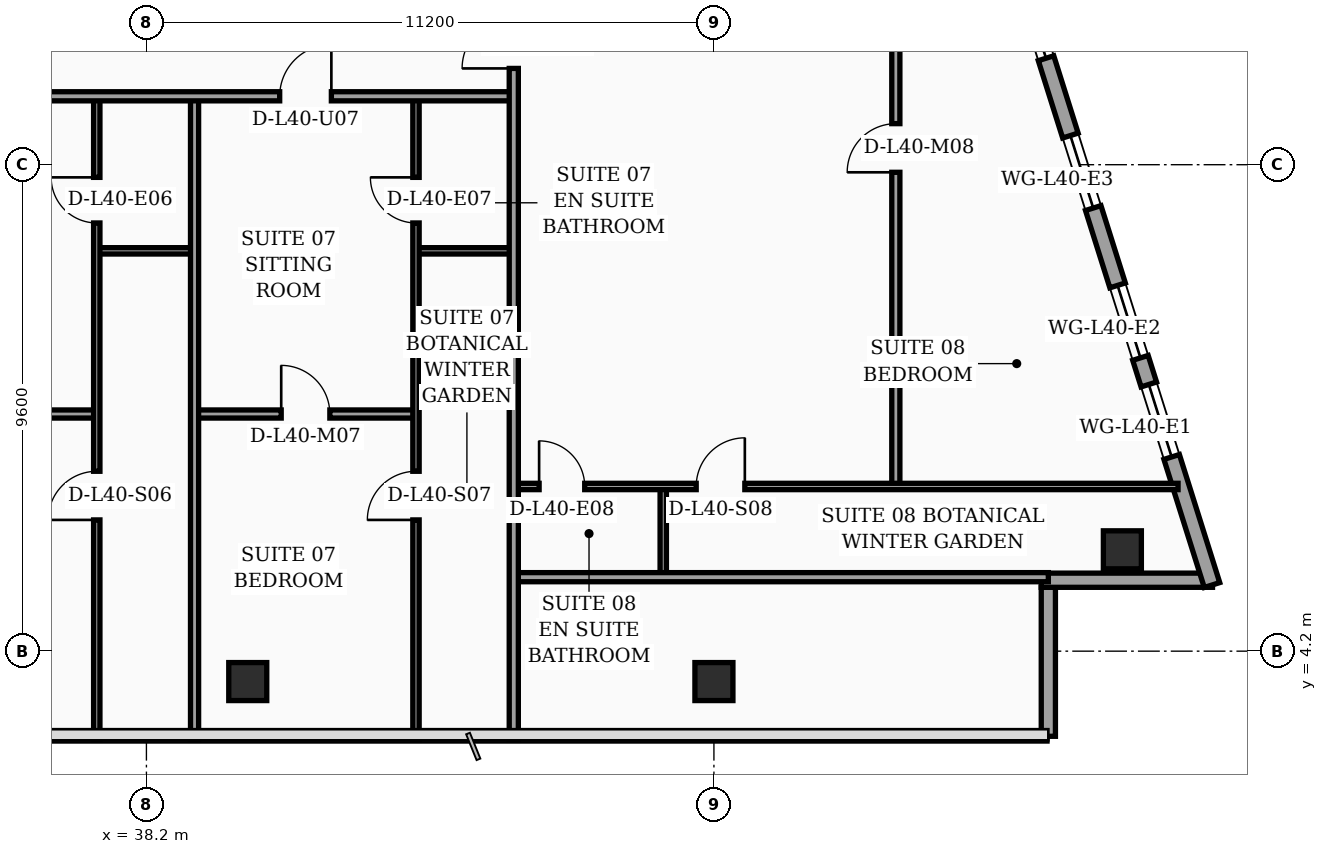
"""IFC4 building model, lengths in metres.
Left out: names, types, materials, properties, quantities, classifications, styles, units other than length and angle.
Written with IfcOpenShell. Run it as: python <this file> out.ifc"""

import sys

from ifc_helpers import new_model, si_unit, direction, frame, frame_2d, origin, origin_2d, place, context, subcontext, project, spatial, rectangle, hollow_rectangle, extrude, element, fill, save


model = new_model("IFC4")
c1 = context("Model", 3, precision=1e-05, world=origin(), true_north=direction((0.0, 1.0)))
c2 = subcontext(c1, "Body", "Model", "MODEL_VIEW")
j1 = project(units=[si_unit("LENGTHUNIT", "METRE"), si_unit("PLANEANGLEUNIT", "RADIAN")], contexts=[c1])
p1 = place(None, origin())
s1 = spatial("IfcSite", under=j1, at=p1, CompositionType="ELEMENT")
p2 = place(p1, origin())
s2 = spatial("IfcBuilding", under=s1, at=p2, CompositionType="ELEMENT")
p3 = place(p2, frame((0.0, 0.0, 163.7)))
s3 = spatial("IfcBuildingStorey", under=s2, at=p3, CompositionType="ELEMENT", Elevation=163.7)
for number, where, z_axis, x_axis in (
    (1, (40.2, 3.6, 0.0), (0.0, 0.0, 1.0), (1.0, 0.0, 0.0)),
    (2, (49.4, 3.6, 0.0), (0.0, 0.0, 1.0), (1.0, 0.0, 0.0)),
    (3, (57.461, 6.2, 0.0), (0.0, 0.0, 1.0), (1.0, 0.0, 0.0)),
):
    element("IfcColumn", number, at=place(p3, frame(where, z_axis=z_axis, x_axis=x_axis)), inside=s3, PredefinedType="COLUMN", context=c2, shape_type="SweptSolid", body=[
        extrude(hollow_rectangle(XDim=0.75, YDim=0.75, WallThickness=0.032, at=origin_2d()), origin(), (0.0, 0.0, 1.0), 3.56),
    ])
p4 = place(p3, frame((56.0, 2.52, 0.0), z_axis=(0.0, 0.0, 1.0), x_axis=(0.0, 1.0, 0.0)))
e4 = element("IfcWall", 4, at=p4, inside=s3, PredefinedType="SOLIDWALL", context=c2, shape_type="SweptSolid", body=[
    extrude(rectangle(XDim=2.94, YDim=0.28, at=frame_2d((1.47, 0.0))), origin(), (0.0, 0.0, 1.0), 3.04),
])
p5 = place(p3, frame((55.86, 5.6, 0.0), z_axis=(0.0, 0.0, 1.0), x_axis=(1.0, 0.0, 0.0)))
e5 = element("IfcWall", 5, at=p5, inside=s3, PredefinedType="SOLIDWALL", context=c2, shape_type="SweptSolid", body=[
    extrude(rectangle(XDim=3.38, YDim=0.28, at=frame_2d((1.69, 0.0))), origin(), (0.0, 0.0, 1.0), 3.04),
])
p6 = place(p3, frame((59.23, 5.505, 0.0), z_axis=(0.0, 0.0, 1.0), x_axis=(-0.300509063924, 0.953778958931, 0.0)))
e6 = element("IfcWall", 6, at=p6, inside=s3, PredefinedType="SOLIDWALL", context=c2, shape_type="SweptSolid", body=[
    extrude(rectangle(XDim=30.814, YDim=0.32, at=frame_2d((15.407, 0.0))), origin(), (0.0, 0.0, 1.0), 3.56),
])
p7 = place(p6, frame((18.796, 0.0, 0.0)))
e7 = element("IfcOpeningElement", 7, at=p7, cuts=e6, PredefinedType="OPENING", context=c2, shape_type="SweptSolid", body=[
    extrude(rectangle(XDim=1.4, YDim=2.25, at=frame_2d((0.7, 1.125))), frame((0.0, 0.17, 0.0), z_axis=(0.0, -1.0, 0.0), x_axis=(1.0, 0.0, 0.0)), (0.0, 0.0, 1.0), 0.34),
])
p8 = place(p6, frame((2.65, 0.0, 0.75)))
e8 = element("IfcOpeningElement", 8, at=p8, cuts=e6, PredefinedType="OPENING", context=c2, shape_type="SweptSolid", body=[
    extrude(rectangle(XDim=1.5, YDim=1.6, at=frame_2d((0.75, 0.8))), frame((0.0, 0.17, 0.0), z_axis=(0.0, -1.0, 0.0), x_axis=(1.0, 0.0, 0.0)), (0.0, 0.0, 1.0), 0.34),
])
p9 = place(p6, frame((4.7, 0.0, 0.75)))
e9 = element("IfcOpeningElement", 9, at=p9, cuts=e6, PredefinedType="OPENING", context=c2, shape_type="SweptSolid", body=[
    extrude(rectangle(XDim=1.5, YDim=1.6, at=frame_2d((0.75, 0.8))), frame((0.0, 0.17, 0.0), z_axis=(0.0, -1.0, 0.0), x_axis=(1.0, 0.0, 0.0)), (0.0, 0.0, 1.0), 0.34),
])
p10 = place(p6, frame((7.8, 0.0, 0.75)))
e10 = element("IfcOpeningElement", 10, at=p10, cuts=e6, PredefinedType="OPENING", context=c2, shape_type="SweptSolid", body=[
    extrude(rectangle(XDim=1.5, YDim=1.6, at=frame_2d((0.75, 0.8))), frame((0.0, 0.17, 0.0), z_axis=(0.0, -1.0, 0.0), x_axis=(1.0, 0.0, 0.0)), (0.0, 0.0, 1.0), 0.34),
])
p11 = place(p6, frame((10.9, 0.0, 0.75)))
e11 = element("IfcOpeningElement", 11, at=p11, cuts=e6, PredefinedType="OPENING", context=c2, shape_type="SweptSolid", body=[
    extrude(rectangle(XDim=1.5, YDim=1.6, at=frame_2d((0.75, 0.8))), frame((0.0, 0.17, 0.0), z_axis=(0.0, -1.0, 0.0), x_axis=(1.0, 0.0, 0.0)), (0.0, 0.0, 1.0), 0.34),
])
p12 = place(p6, frame((14.0, 0.0, 0.75)))
e12 = element("IfcOpeningElement", 12, at=p12, cuts=e6, PredefinedType="OPENING", context=c2, shape_type="SweptSolid", body=[
    extrude(rectangle(XDim=1.5, YDim=1.6, at=frame_2d((0.75, 0.8))), frame((0.0, 0.17, 0.0), z_axis=(0.0, -1.0, 0.0), x_axis=(1.0, 0.0, 0.0)), (0.0, 0.0, 1.0), 0.34),
])
p13 = place(p6, frame((16.55, 0.0, 0.75)))
e13 = element("IfcOpeningElement", 13, at=p13, cuts=e6, PredefinedType="OPENING", context=c2, shape_type="SweptSolid", body=[
    extrude(rectangle(XDim=1.5, YDim=1.6, at=frame_2d((0.75, 0.8))), frame((0.0, 0.17, 0.0), z_axis=(0.0, -1.0, 0.0), x_axis=(1.0, 0.0, 0.0)), (0.0, 0.0, 1.0), 0.34),
])
p14 = place(p6, frame((20.75, 0.0, 0.75)))
e14 = element("IfcOpeningElement", 14, at=p14, cuts=e6, PredefinedType="OPENING", context=c2, shape_type="SweptSolid", body=[
    extrude(rectangle(XDim=1.5, YDim=1.6, at=frame_2d((0.75, 0.8))), frame((0.0, 0.17, 0.0), z_axis=(0.0, -1.0, 0.0), x_axis=(1.0, 0.0, 0.0)), (0.0, 0.0, 1.0), 0.34),
])
p15 = place(p6, frame((26.4, 0.0, 0.75)))
e15 = element("IfcOpeningElement", 15, at=p15, cuts=e6, PredefinedType="OPENING", context=c2, shape_type="SweptSolid", body=[
    extrude(rectangle(XDim=1.5, YDim=1.6, at=frame_2d((0.75, 0.8))), frame((0.0, 0.17, 0.0), z_axis=(0.0, -1.0, 0.0), x_axis=(1.0, 0.0, 0.0)), (0.0, 0.0, 1.0), 0.34),
])
p16 = place(p3, frame((37.22, 12.1, 0.0), z_axis=(0.0, 0.0, 1.0), x_axis=(1.0, 0.0, 0.0)))
e16 = element("IfcWall", 16, at=p16, inside=s3, PredefinedType="PARTITIONING", context=c2, shape_type="SweptSolid", body=[
    extrude(rectangle(XDim=1.93, YDim=0.125, at=frame_2d((0.965, 0.0))), origin(), (0.0, 0.0, 1.0), 3.56),
])
p17 = place(p3, frame((32.4, 8.88, 0.0), z_axis=(0.0, 0.0, 1.0), x_axis=(1.0, 0.0, 0.0)))
e17 = element("IfcWall", 17, at=p17, inside=s3, PredefinedType="PARTITIONING", context=c2, shape_type="SweptSolid", body=[
    extrude(rectangle(XDim=4.82, YDim=0.16, at=frame_2d((2.41, 0.0))), origin(), (0.0, 0.0, 1.0), 2.94),
])
p18 = place(p17, frame((1.93, 0.0, 0.0)))
e18 = element("IfcOpeningElement", 18, at=p18, cuts=e17, PredefinedType="OPENING", context=c2, shape_type="SweptSolid", body=[
    extrude(rectangle(XDim=0.96, YDim=2.2, at=frame_2d((0.48, 1.1))), frame((0.0, 0.09, 0.0), z_axis=(0.0, -1.0, 0.0), x_axis=(1.0, 0.0, 0.0)), (0.0, 0.0, 1.0), 0.18),
])
p19 = place(p3, frame((37.22, 2.44, 0.0), z_axis=(0.0, 0.0, 1.0), x_axis=(0.0, 1.0, 0.0)))
e19 = element("IfcWall", 19, at=p19, inside=s3, PredefinedType="PARTITIONING", context=c2, shape_type="SweptSolid", body=[
    extrude(rectangle(XDim=12.71, YDim=0.125, at=frame_2d((6.355, 0.0))), origin(), (0.0, 0.0, 1.0), 2.94),
])
p20 = place(p19, frame((4.35, 0.0, 0.0)))
e20 = element("IfcOpeningElement", 20, at=p20, cuts=e19, PredefinedType="OPENING", context=c2, shape_type="SweptSolid", body=[
    extrude(rectangle(XDim=0.96, YDim=2.2, at=frame_2d((0.48, 1.1))), frame((0.0, 0.073, 0.0), z_axis=(0.0, -1.0, 0.0), x_axis=(1.0, 0.0, 0.0)), (0.0, 0.0, 1.0), 0.145),
])
p21 = place(p19, frame((10.21, 0.0, 0.0)))
e21 = element("IfcOpeningElement", 21, at=p21, cuts=e19, PredefinedType="OPENING", context=c2, shape_type="SweptSolid", body=[
    extrude(rectangle(XDim=0.9, YDim=2.15, at=frame_2d((0.45, 1.075))), frame((0.0, 0.073, 0.0), z_axis=(0.0, -1.0, 0.0), x_axis=(1.0, 0.0, 0.0)), (0.0, 0.0, 1.0), 0.145),
])
p22 = place(p3, frame((43.52, 12.1, 0.0), z_axis=(0.0, 0.0, 1.0), x_axis=(1.0, 0.0, 0.0)))
e22 = element("IfcWall", 22, at=p22, inside=s3, PredefinedType="PARTITIONING", context=c2, shape_type="SweptSolid", body=[
    extrude(rectangle(XDim=1.93, YDim=0.125, at=frame_2d((0.965, 0.0))), origin(), (0.0, 0.0, 1.0), 3.56),
])
p23 = place(p3, frame((39.15, 8.88, 0.0), z_axis=(0.0, 0.0, 1.0), x_axis=(1.0, 0.0, 0.0)))
e23 = element("IfcWall", 23, at=p23, inside=s3, PredefinedType="PARTITIONING", context=c2, shape_type="SweptSolid", body=[
    extrude(rectangle(XDim=4.37, YDim=0.16, at=frame_2d((2.185, 0.0))), origin(), (0.0, 0.0, 1.0), 3.09),
])
p24 = place(p23, frame((1.71, 0.0, 0.0)))
e24 = element("IfcOpeningElement", 24, at=p24, cuts=e23, PredefinedType="OPENING", context=c2, shape_type="SweptSolid", body=[
    extrude(rectangle(XDim=0.96, YDim=2.2, at=frame_2d((0.48, 1.1))), frame((0.0, 0.09, 0.0), z_axis=(0.0, -1.0, 0.0), x_axis=(1.0, 0.0, 0.0)), (0.0, 0.0, 1.0), 0.18),
])
p25 = place(p3, frame((43.52, 2.44, 0.0), z_axis=(0.0, 0.0, 1.0), x_axis=(0.0, 1.0, 0.0)))
e25 = element("IfcWall", 25, at=p25, inside=s3, PredefinedType="PARTITIONING", context=c2, shape_type="SweptSolid", body=[
    extrude(rectangle(XDim=12.71, YDim=0.125, at=frame_2d((6.355, 0.0))), origin(), (0.0, 0.0, 1.0), 3.04),
])
p26 = place(p25, frame((4.35, 0.0, 0.0)))
e26 = element("IfcOpeningElement", 26, at=p26, cuts=e25, PredefinedType="OPENING", context=c2, shape_type="SweptSolid", body=[
    extrude(rectangle(XDim=0.96, YDim=2.2, at=frame_2d((0.48, 1.1))), frame((0.0, 0.073, 0.0), z_axis=(0.0, -1.0, 0.0), x_axis=(1.0, 0.0, 0.0)), (0.0, 0.0, 1.0), 0.145),
])
p27 = place(p25, frame((10.21, 0.0, 0.0)))
e27 = element("IfcOpeningElement", 27, at=p27, cuts=e25, PredefinedType="OPENING", context=c2, shape_type="SweptSolid", body=[
    extrude(rectangle(XDim=0.9, YDim=2.15, at=frame_2d((0.45, 1.075))), frame((0.0, 0.073, 0.0), z_axis=(0.0, -1.0, 0.0), x_axis=(1.0, 0.0, 0.0)), (0.0, 0.0, 1.0), 0.145),
])
p28 = place(p3, frame((39.15, 2.44, 0.0), z_axis=(0.0, 0.0, 1.0), x_axis=(0.0, 1.0, 0.0)))
e28 = element("IfcWall", 28, at=p28, inside=s3, PredefinedType="PARTITIONING", context=c2, shape_type="SweptSolid", body=[
    extrude(rectangle(XDim=12.71, YDim=0.16, at=frame_2d((6.355, 0.0))), origin(), (0.0, 0.0, 1.0), 2.94),
])
p29 = place(p3, frame((32.4, 15.15, 0.0), z_axis=(0.0, 0.0, 1.0), x_axis=(1.0, 0.0, 0.0)))
e29 = element("IfcWall", 29, at=p29, inside=s3, PredefinedType="PARTITIONING", context=c2, shape_type="SweptSolid", body=[
    extrude(rectangle(XDim=13.05, YDim=0.18, at=frame_2d((6.525, 0.0))), origin(), (0.0, 0.0, 1.0), 2.94),
])
p30 = place(p29, frame((2.0, 0.0, 0.0)))
e30 = element("IfcOpeningElement", 30, at=p30, cuts=e29, PredefinedType="OPENING", context=c2, shape_type="SweptSolid", body=[
    extrude(rectangle(XDim=1.02, YDim=2.2, at=frame_2d((0.51, 1.1))), frame((0.0, 0.1, 0.0), z_axis=(0.0, -1.0, 0.0), x_axis=(1.0, 0.0, 0.0)), (0.0, 0.0, 1.0), 0.2),
])
p31 = place(p29, frame((8.43, 0.0, 0.0)))
e31 = element("IfcOpeningElement", 31, at=p31, cuts=e29, PredefinedType="OPENING", context=c2, shape_type="SweptSolid", body=[
    extrude(rectangle(XDim=1.02, YDim=2.2, at=frame_2d((0.51, 1.1))), frame((0.0, 0.1, 0.0), z_axis=(0.0, -1.0, 0.0), x_axis=(1.0, 0.0, 0.0)), (0.0, 0.0, 1.0), 0.2),
])
p32 = place(p3, frame((48.4, 5.66, 0.0), z_axis=(0.0, 0.0, 1.0), x_axis=(0.0, 1.0, 0.0)))
e32 = element("IfcWall", 32, at=p32, inside=s3, PredefinedType="PARTITIONING", context=c2, shape_type="SweptSolid", body=[
    extrude(rectangle(XDim=1.79, YDim=0.125, at=frame_2d((0.895, 0.0))), origin(), (0.0, 0.0, 1.0), 2.94),
])
p33 = place(p3, frame((52.99, 7.45, 0.0), z_axis=(0.0, 0.0, 1.0), x_axis=(0.0, 1.0, 0.0)))
e33 = element("IfcWall", 33, at=p33, inside=s3, PredefinedType="PARTITIONING", context=c2, shape_type="SweptSolid", body=[
    extrude(rectangle(XDim=13.35, YDim=0.16, at=frame_2d((6.675, 0.0))), origin(), (0.0, 0.0, 1.0), 2.94),
])
p34 = place(p33, frame((6.2, 0.0, 0.0)))
e34 = element("IfcOpeningElement", 34, at=p34, cuts=e33, PredefinedType="OPENING", context=c2, shape_type="SweptSolid", body=[
    extrude(rectangle(XDim=0.96, YDim=2.2, at=frame_2d((0.48, 1.1))), frame((0.0, 0.09, 0.0), z_axis=(0.0, -1.0, 0.0), x_axis=(1.0, 0.0, 0.0)), (0.0, 0.0, 1.0), 0.18),
])
p35 = place(p3, frame((45.45, 7.45, 0.0), z_axis=(0.0, 0.0, 1.0), x_axis=(1.0, 0.0, 0.0)))
e35 = element("IfcWall", 35, at=p35, inside=s3, PredefinedType="PARTITIONING", context=c2, shape_type="SweptSolid", body=[
    extrude(rectangle(XDim=13.11, YDim=0.125, at=frame_2d((6.555, 0.0))), origin(), (0.0, 0.0, 1.0), 2.94),
])
p36 = place(p35, frame((0.5, 0.0, 0.0)))
e36 = element("IfcOpeningElement", 36, at=p36, cuts=e35, PredefinedType="OPENING", context=c2, shape_type="SweptSolid", body=[
    extrude(rectangle(XDim=0.9, YDim=2.15, at=frame_2d((0.45, 1.075))), frame((0.0, 0.073, 0.0), z_axis=(0.0, -1.0, 0.0), x_axis=(1.0, 0.0, 0.0)), (0.0, 0.0, 1.0), 0.145),
])
p37 = place(p35, frame((3.6, 0.0, 0.0)))
e37 = element("IfcOpeningElement", 37, at=p37, cuts=e35, PredefinedType="OPENING", context=c2, shape_type="SweptSolid", body=[
    extrude(rectangle(XDim=0.96, YDim=2.2, at=frame_2d((0.48, 1.1))), frame((0.0, 0.073, 0.0), z_axis=(0.0, -1.0, 0.0), x_axis=(1.0, 0.0, 0.0)), (0.0, 0.0, 1.0), 0.145),
])
p38 = place(p3, frame((45.45, 5.66, 0.0), z_axis=(0.0, 0.0, 1.0), x_axis=(1.0, 0.0, 0.0)))
e38 = element("IfcWall", 38, at=p38, inside=s3, PredefinedType="PARTITIONING", context=c2, shape_type="SweptSolid", body=[
    extrude(rectangle(XDim=10.55, YDim=0.18, at=frame_2d((5.275, 0.0))), origin(), (0.0, 0.0, 1.0), 2.94),
])
p39 = place(p3, frame((45.45, 2.44, 0.0), z_axis=(0.0, 0.0, 1.0), x_axis=(0.0, 1.0, 0.0)))
e39 = element("IfcWall", 39, at=p39, inside=s3, PredefinedType="PARTITIONING", context=c2, shape_type="SweptSolid", body=[
    extrude(rectangle(XDim=27.84, YDim=0.18, at=frame_2d((13.92, 0.0))), origin(), (0.0, 0.0, 1.0), 2.94),
])
p40 = place(p39, frame((13.26, 0.0, 0.0)))
e40 = element("IfcOpeningElement", 40, at=p40, cuts=e39, PredefinedType="OPENING", context=c2, shape_type="SweptSolid", body=[
    extrude(rectangle(XDim=1.02, YDim=2.2, at=frame_2d((0.51, 1.1))), frame((0.0, 0.1, 0.0), z_axis=(0.0, -1.0, 0.0), x_axis=(1.0, 0.0, 0.0)), (0.0, 0.0, 1.0), 0.2),
])
p41 = place(p39, frame((21.52, 0.0, 0.0)))
e41 = element("IfcOpeningElement", 41, at=p41, cuts=e39, PredefinedType="OPENING", context=c2, shape_type="SweptSolid", body=[
    extrude(rectangle(XDim=1.02, YDim=2.2, at=frame_2d((0.51, 1.1))), frame((0.0, 0.1, 0.0), z_axis=(0.0, -1.0, 0.0), x_axis=(1.0, 0.0, 0.0)), (0.0, 0.0, 1.0), 0.2),
])
p42 = place(p8, origin())
e42 = element("IfcWindow", 42, at=p42, inside=s3, PartitioningType="SINGLE_PANEL", PredefinedType="WINDOW", context=c2, shape_type="SweptSolid", body=[
    extrude(rectangle(XDim=1.5, YDim=1.6, at=frame_2d((0.75, 0.8))), frame((0.0, 0.03, 0.0), z_axis=(0.0, -1.0, 0.0), x_axis=(1.0, 0.0, 0.0)), (0.0, 0.0, 1.0), 0.06),
])
fill(e8, e42)
p43 = place(p9, origin())
e43 = element("IfcWindow", 43, at=p43, inside=s3, PartitioningType="SINGLE_PANEL", PredefinedType="WINDOW", context=c2, shape_type="SweptSolid", body=[
    extrude(rectangle(XDim=1.5, YDim=1.6, at=frame_2d((0.75, 0.8))), frame((0.0, 0.03, 0.0), z_axis=(0.0, -1.0, 0.0), x_axis=(1.0, 0.0, 0.0)), (0.0, 0.0, 1.0), 0.06),
])
fill(e9, e43)
p44 = place(p10, origin())
e44 = element("IfcWindow", 44, at=p44, inside=s3, PartitioningType="SINGLE_PANEL", PredefinedType="WINDOW", context=c2, shape_type="SweptSolid", body=[
    extrude(rectangle(XDim=1.5, YDim=1.6, at=frame_2d((0.75, 0.8))), frame((0.0, 0.03, 0.0), z_axis=(0.0, -1.0, 0.0), x_axis=(1.0, 0.0, 0.0)), (0.0, 0.0, 1.0), 0.06),
])
fill(e10, e44)
p45 = place(p11, origin())
e45 = element("IfcWindow", 45, at=p45, inside=s3, PartitioningType="SINGLE_PANEL", PredefinedType="WINDOW", context=c2, shape_type="SweptSolid", body=[
    extrude(rectangle(XDim=1.5, YDim=1.6, at=frame_2d((0.75, 0.8))), frame((0.0, 0.03, 0.0), z_axis=(0.0, -1.0, 0.0), x_axis=(1.0, 0.0, 0.0)), (0.0, 0.0, 1.0), 0.06),
])
fill(e11, e45)
p46 = place(p20, origin())
e46 = element("IfcDoor", 46, at=p46, inside=s3, OperationType="SINGLE_SWING_LEFT", PredefinedType="DOOR", context=c2, shape_type="SweptSolid", body=[
    extrude(rectangle(XDim=0.96, YDim=2.2, at=frame_2d((0.48, 1.1))), frame((0.0, 0.025, 0.0), z_axis=(0.0, -1.0, 0.0), x_axis=(1.0, 0.0, 0.0)), (0.0, 0.0, 1.0), 0.05),
])
fill(e20, e46)
p47 = place(p21, origin())
e47 = element("IfcDoor", 47, at=p47, inside=s3, OperationType="SINGLE_SWING_RIGHT", PredefinedType="DOOR", context=c2, shape_type="SweptSolid", body=[
    extrude(rectangle(XDim=0.9, YDim=2.15, at=frame_2d((0.45, 1.075))), frame((0.0, 0.025, 0.0), z_axis=(0.0, -1.0, 0.0), x_axis=(1.0, 0.0, 0.0)), (0.0, 0.0, 1.0), 0.05),
])
fill(e21, e47)
p48 = place(p24, origin())
e48 = element("IfcDoor", 48, at=p48, inside=s3, OperationType="SINGLE_SWING_LEFT", PredefinedType="DOOR", context=c2, shape_type="SweptSolid", body=[
    extrude(rectangle(XDim=0.96, YDim=2.2, at=frame_2d((0.48, 1.1))), frame((0.0, 0.025, 0.0), z_axis=(0.0, -1.0, 0.0), x_axis=(1.0, 0.0, 0.0)), (0.0, 0.0, 1.0), 0.05),
])
fill(e24, e48)
p49 = place(p26, origin())
e49 = element("IfcDoor", 49, at=p49, inside=s3, OperationType="SINGLE_SWING_LEFT", PredefinedType="DOOR", context=c2, shape_type="SweptSolid", body=[
    extrude(rectangle(XDim=0.96, YDim=2.2, at=frame_2d((0.48, 1.1))), frame((0.0, 0.025, 0.0), z_axis=(0.0, -1.0, 0.0), x_axis=(1.0, 0.0, 0.0)), (0.0, 0.0, 1.0), 0.05),
])
fill(e26, e49)
p50 = place(p27, origin())
e50 = element("IfcDoor", 50, at=p50, inside=s3, OperationType="SINGLE_SWING_RIGHT", PredefinedType="DOOR", context=c2, shape_type="SweptSolid", body=[
    extrude(rectangle(XDim=0.9, YDim=2.15, at=frame_2d((0.45, 1.075))), frame((0.0, 0.025, 0.0), z_axis=(0.0, -1.0, 0.0), x_axis=(1.0, 0.0, 0.0)), (0.0, 0.0, 1.0), 0.05),
])
fill(e27, e50)
p51 = place(p31, origin())
e51 = element("IfcDoor", 51, at=p51, inside=s3, OperationType="SINGLE_SWING_RIGHT", PredefinedType="DOOR", context=c2, shape_type="SweptSolid", body=[
    extrude(rectangle(XDim=1.02, YDim=2.2, at=frame_2d((0.51, 1.1))), frame((0.0, 0.025, 0.0), z_axis=(0.0, -1.0, 0.0), x_axis=(1.0, 0.0, 0.0)), (0.0, 0.0, 1.0), 0.05),
])
fill(e31, e51)
p52 = place(p34, origin())
e52 = element("IfcDoor", 52, at=p52, inside=s3, OperationType="SINGLE_SWING_LEFT", PredefinedType="DOOR", context=c2, shape_type="SweptSolid", body=[
    extrude(rectangle(XDim=0.96, YDim=2.2, at=frame_2d((0.48, 1.1))), frame((0.0, 0.025, 0.0), z_axis=(0.0, -1.0, 0.0), x_axis=(1.0, 0.0, 0.0)), (0.0, 0.0, 1.0), 0.05),
])
fill(e34, e52)
p53 = place(p36, origin())
e53 = element("IfcDoor", 53, at=p53, inside=s3, OperationType="SINGLE_SWING_LEFT", PredefinedType="DOOR", context=c2, shape_type="SweptSolid", body=[
    extrude(rectangle(XDim=0.9, YDim=2.15, at=frame_2d((0.45, 1.075))), frame((0.0, 0.025, 0.0), z_axis=(0.0, -1.0, 0.0), x_axis=(1.0, 0.0, 0.0)), (0.0, 0.0, 1.0), 0.05),
])
fill(e36, e53)
p54 = place(p37, origin())
e54 = element("IfcDoor", 54, at=p54, inside=s3, OperationType="SINGLE_SWING_RIGHT", PredefinedType="DOOR", context=c2, shape_type="SweptSolid", body=[
    extrude(rectangle(XDim=0.96, YDim=2.2, at=frame_2d((0.48, 1.1))), frame((0.0, 0.025, 0.0), z_axis=(0.0, -1.0, 0.0), x_axis=(1.0, 0.0, 0.0)), (0.0, 0.0, 1.0), 0.05),
])
fill(e37, e54)
p55 = place(p40, origin())
e55 = element("IfcDoor", 55, at=p55, inside=s3, OperationType="SINGLE_SWING_LEFT", PredefinedType="DOOR", context=c2, shape_type="SweptSolid", body=[
    extrude(rectangle(XDim=1.02, YDim=2.2, at=frame_2d((0.51, 1.1))), frame((0.0, 0.025, 0.0), z_axis=(0.0, -1.0, 0.0), x_axis=(1.0, 0.0, 0.0)), (0.0, 0.0, 1.0), 0.05),
])
fill(e40, e55)
save(model, sys.argv[1])
